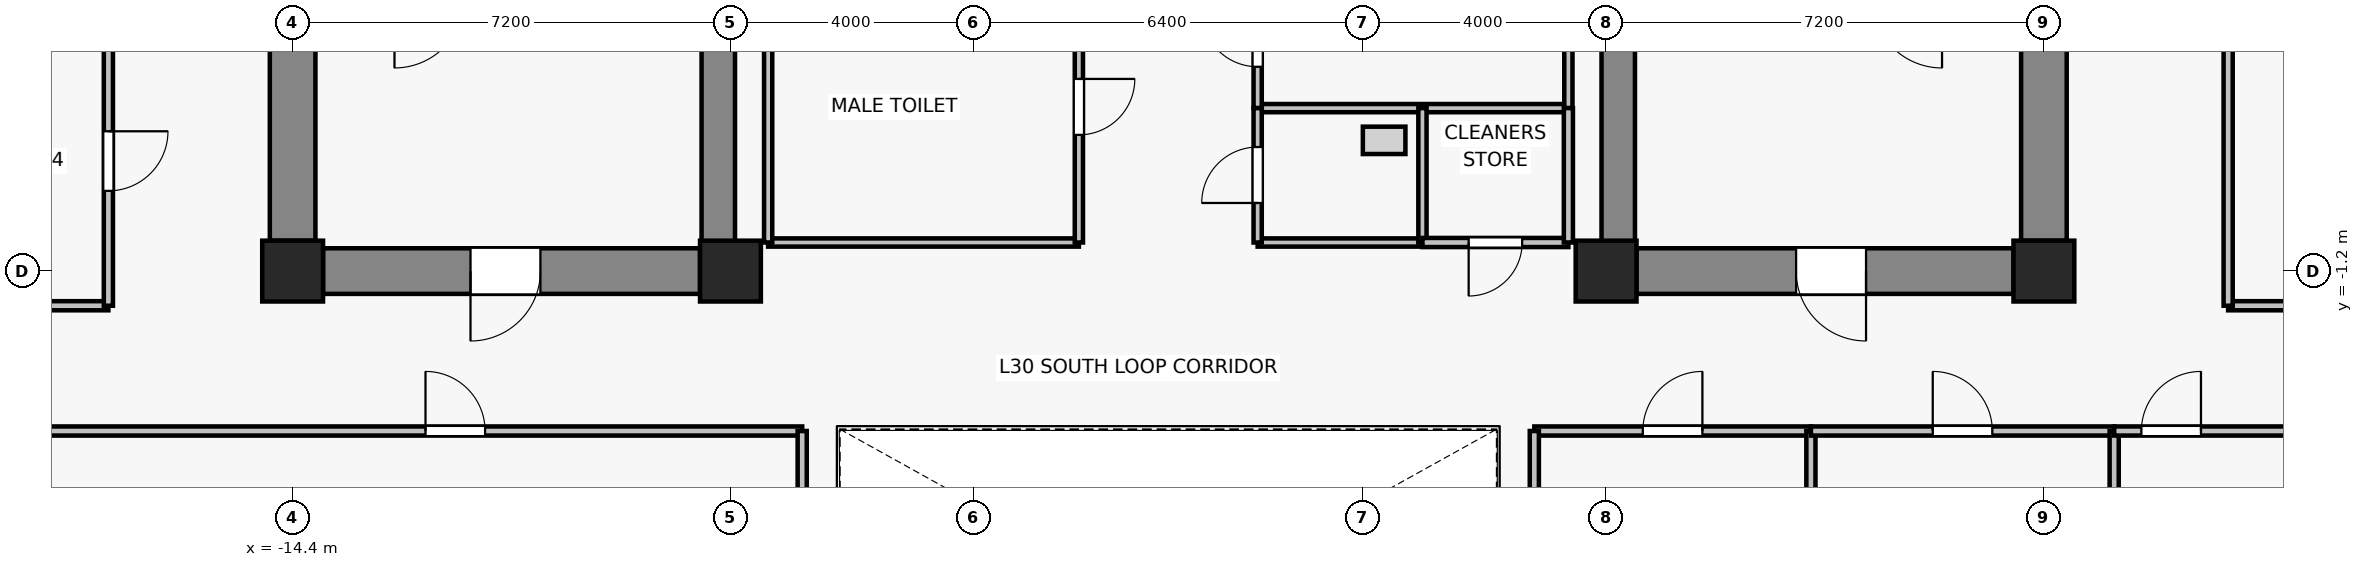
"""IFC4 building model, lengths in metres.
Left out: names, types, materials, properties, quantities, classifications, styles, units other than length and angle.
Written with IfcOpenShell. Run it as: python <this file> out.ifc"""

import sys

from ifc_helpers import new_model, si_unit, direction, frame, frame_2d, origin, origin_2d, place, context, subcontext, project, spatial, rectangle, extrude, source, transform, mapped, element, fill, save


model = new_model("IFC4")
c1 = context("Model", 3, precision=1e-05, world=origin(), true_north=direction((0.0, 1.0)))
c2 = subcontext(c1, "Body", "Model", "MODEL_VIEW")
j1 = project(units=[si_unit("LENGTHUNIT", "METRE"), si_unit("PLANEANGLEUNIT", "RADIAN")], contexts=[c1])
p1 = place(None, origin())
s1 = spatial("IfcSite", under=j1, at=p1, CompositionType="ELEMENT")
p2 = place(p1, origin())
s2 = spatial("IfcBuilding", under=s1, at=p2, CompositionType="ELEMENT")
p3 = place(p2, frame((0.0, 0.0, 109.9)))
s3 = spatial("IfcBuildingStorey", under=s2, at=p3, CompositionType="ELEMENT", Elevation=109.9)
for number, where, z_axis, x_axis in (
    (1, (-14.4, -1.2, 0.0), (0.0, 0.0, 1.0), (1.0, 0.0, 0.0)),
    (2, (-7.2, -1.2, 0.0), (0.0, 0.0, 1.0), (1.0, 0.0, 0.0)),
    (3, (7.2, -1.2, 0.0), (0.0, 0.0, 1.0), (1.0, 0.0, 0.0)),
    (4, (14.4, -1.2, 0.0), (0.0, 0.0, 1.0), (1.0, 0.0, 0.0)),
):
    element("IfcColumn", number, at=place(p3, frame(where, z_axis=z_axis, x_axis=x_axis)), inside=s3, PredefinedType="COLUMN", context=c2, shape_type="SweptSolid", body=[
        extrude(rectangle(XDim=1.0, YDim=1.0, at=origin_2d()), origin(), (0.0, 0.0, 1.0), 3.3),
    ])
for number, where, z_axis, x_axis in (
    (5, (-14.4, -0.7, 0.0), (0.0, 0.0, 1.0), (0.0, 1.0, 0.0)),
    (6, (14.4, -0.7, 0.0), (0.0, 0.0, 1.0), (0.0, 1.0, 0.0)),
):
    element("IfcWall", number, at=place(p3, frame(where, z_axis=z_axis, x_axis=x_axis)), inside=s3, PredefinedType="SHEAR", context=c2, shape_type="SweptSolid", body=[
        extrude(rectangle(XDim=6.8, YDim=0.75, at=frame_2d((3.4, 0.0))), origin(), (0.0, 0.0, 1.0), 3.075),
    ])
p4 = place(p3, frame((-7.7, -1.2, 0.0), z_axis=(0.0, 0.0, 1.0), x_axis=(-1.0, 0.0, 0.0)))
e7 = element("IfcWall", 7, at=p4, inside=s3, PredefinedType="SHEAR", context=c2, shape_type="SweptSolid", body=[
    extrude(rectangle(XDim=6.2, YDim=0.75, at=frame_2d((3.1, 0.0))), origin(), (0.0, 0.0, 1.0), 3.075),
])
p5 = place(p4, frame((2.625, 0.0, 0.0)))
e8 = element("IfcOpeningElement", 8, at=p5, cuts=e7, PredefinedType="OPENING", context=c2, shape_type="SweptSolid", body=[
    extrude(rectangle(XDim=1.15, YDim=2.15, at=frame_2d((0.575, 1.075))), frame((0.0, 0.385, 0.0), z_axis=(0.0, -1.0, 0.0), x_axis=(1.0, 0.0, 0.0)), (0.0, 0.0, 1.0), 0.77),
])
p6 = place(p3, frame((13.9, -1.2, 0.0), z_axis=(0.0, 0.0, 1.0), x_axis=(-1.0, 0.0, 0.0)))
e9 = element("IfcWall", 9, at=p6, inside=s3, PredefinedType="SHEAR", context=c2, shape_type="SweptSolid", body=[
    extrude(rectangle(XDim=6.2, YDim=0.75, at=frame_2d((3.1, 0.0))), origin(), (0.0, 0.0, 1.0), 3.075),
])
p7 = place(p6, frame((2.425, 0.0, 0.0)))
e10 = element("IfcOpeningElement", 10, at=p7, cuts=e9, PredefinedType="OPENING", context=c2, shape_type="SweptSolid", body=[
    extrude(rectangle(XDim=1.15, YDim=2.15, at=frame_2d((0.575, 1.075))), frame((0.0, 0.385, 0.0), z_axis=(0.0, -1.0, 0.0), x_axis=(1.0, 0.0, 0.0)), (0.0, 0.0, 1.0), 0.77),
])
for number, where, z_axis, x_axis in (
    (11, (-7.4, -0.825, 0.0), (0.0, 0.0, 1.0), (0.0, 1.0, 0.0)),
    (12, (7.4, -0.825, 0.0), (0.0, 0.0, 1.0), (0.0, 1.0, 0.0)),
):
    element("IfcWall", number, at=place(p3, frame(where, z_axis=z_axis, x_axis=x_axis)), inside=s3, PredefinedType="SHEAR", context=c2, shape_type="SweptSolid", body=[
        extrude(rectangle(XDim=4.075, YDim=0.55, at=frame_2d((2.038, 0.0))), origin(), (0.0, 0.0, 1.0), 3.075),
    ])
p8 = place(p3, frame((-1.47, -0.73, 0.0), z_axis=(0.0, 0.0, 1.0), x_axis=(-1.0, 0.0, 0.0)))
e13 = element("IfcWall", 13, at=p8, inside=s3, PredefinedType="PARTITIONING", context=c2, shape_type="SweptSolid", body=[
    extrude(rectangle(XDim=5.11, YDim=0.135, at=frame_2d((2.555, 0.0))), origin(), (0.0, 0.0, 1.0), 3.075),
])
p9 = place(p3, frame((-6.58, -0.73, 0.0), z_axis=(0.0, 0.0, 1.0), x_axis=(0.0, 1.0, 0.0)))
e14 = element("IfcWall", 14, at=p9, inside=s3, PredefinedType="PARTITIONING", context=c2, shape_type="SweptSolid", body=[
    extrude(rectangle(XDim=4.49, YDim=0.135, at=frame_2d((2.245, 0.0))), origin(), (0.0, 0.0, 1.0), 3.075),
])
p10 = place(p3, frame((-1.47, 3.76, 0.0), z_axis=(0.0, 0.0, 1.0), x_axis=(0.0, -1.0, 0.0)))
e15 = element("IfcWall", 15, at=p10, inside=s3, PredefinedType="PARTITIONING", context=c2, shape_type="SweptSolid", body=[
    extrude(rectangle(XDim=4.49, YDim=0.135, at=frame_2d((2.245, 0.0))), origin(), (0.0, 0.0, 1.0), 3.075),
])
p11 = place(p10, frame((1.8, 0.0, 0.0)))
e16 = element("IfcOpeningElement", 16, at=p11, cuts=e15, PredefinedType="OPENING", context=c2, shape_type="SweptSolid", body=[
    extrude(rectangle(XDim=0.92, YDim=2.1, at=frame_2d((0.46, 1.05))), frame((0.0, 0.077, 0.0), z_axis=(0.0, -1.0, 0.0), x_axis=(1.0, 0.0, 0.0)), (0.0, 0.0, 1.0), 0.155),
])
p12 = place(p3, frame((6.58, 1.48, 0.0), z_axis=(0.0, 0.0, 1.0), x_axis=(-1.0, 0.0, 0.0)))
e17 = element("IfcWall", 17, at=p12, inside=s3, PredefinedType="PARTITIONING", context=c2, shape_type="SweptSolid", body=[
    extrude(rectangle(XDim=5.11, YDim=0.135, at=frame_2d((2.555, 0.0))), origin(), (0.0, 0.0, 1.0), 3.075),
])
p13 = place(p3, frame((1.47, 1.48, 0.0), z_axis=(0.0, 0.0, 1.0), x_axis=(0.0, 1.0, 0.0)))
e18 = element("IfcWall", 18, at=p13, inside=s3, PredefinedType="PARTITIONING", context=c2, shape_type="SweptSolid", body=[
    extrude(rectangle(XDim=2.28, YDim=0.135, at=frame_2d((1.14, 0.0))), origin(), (0.0, 0.0, 1.0), 3.075),
])
p14 = place(p13, frame((0.68, 0.0, 0.0)))
e19 = element("IfcOpeningElement", 19, at=p14, cuts=e18, PredefinedType="OPENING", context=c2, shape_type="SweptSolid", body=[
    extrude(rectangle(XDim=0.92, YDim=2.1, at=frame_2d((0.46, 1.05))), frame((0.0, 0.077, 0.0), z_axis=(0.0, -1.0, 0.0), x_axis=(1.0, 0.0, 0.0)), (0.0, 0.0, 1.0), 0.155),
])
p15 = place(p3, frame((6.58, 3.76, 0.0), z_axis=(0.0, 0.0, 1.0), x_axis=(0.0, -1.0, 0.0)))
e20 = element("IfcWall", 20, at=p15, inside=s3, PredefinedType="PARTITIONING", context=c2, shape_type="SweptSolid", body=[
    extrude(rectangle(XDim=2.28, YDim=0.135, at=frame_2d((1.14, 0.0))), origin(), (0.0, 0.0, 1.0), 3.075),
])
p16 = place(p3, frame((4.18, -0.73, 0.0), z_axis=(0.0, 0.0, 1.0), x_axis=(-1.0, 0.0, 0.0)))
e21 = element("IfcWall", 21, at=p16, inside=s3, PredefinedType="PARTITIONING", context=c2, shape_type="SweptSolid", body=[
    extrude(rectangle(XDim=2.71, YDim=0.135, at=frame_2d((1.355, 0.0))), origin(), (0.0, 0.0, 1.0), 3.075),
])
p17 = place(p3, frame((1.47, -0.73, 0.0), z_axis=(0.0, 0.0, 1.0), x_axis=(0.0, 1.0, 0.0)))
e22 = element("IfcWall", 22, at=p17, inside=s3, PredefinedType="PARTITIONING", context=c2, shape_type="SweptSolid", body=[
    extrude(rectangle(XDim=2.21, YDim=0.135, at=frame_2d((1.105, 0.0))), origin(), (0.0, 0.0, 1.0), 3.075),
])
p18 = place(p17, frame((0.65, 0.0, 0.0)))
e23 = element("IfcOpeningElement", 23, at=p18, cuts=e22, PredefinedType="OPENING", context=c2, shape_type="SweptSolid", body=[
    extrude(rectangle(XDim=0.92, YDim=2.1, at=frame_2d((0.46, 1.05))), frame((0.0, 0.077, 0.0), z_axis=(0.0, -1.0, 0.0), x_axis=(1.0, 0.0, 0.0)), (0.0, 0.0, 1.0), 0.155),
])
p19 = place(p3, frame((4.18, 1.48, 0.0), z_axis=(0.0, 0.0, 1.0), x_axis=(0.0, -1.0, 0.0)))
e24 = element("IfcWall", 24, at=p19, inside=s3, PredefinedType="PARTITIONING", context=c2, shape_type="SweptSolid", body=[
    extrude(rectangle(XDim=2.21, YDim=0.135, at=frame_2d((1.105, 0.0))), origin(), (0.0, 0.0, 1.0), 3.075),
])
p20 = place(p3, frame((6.58, -0.73, 0.0), z_axis=(0.0, 0.0, 1.0), x_axis=(-1.0, 0.0, 0.0)))
e25 = element("IfcWall", 25, at=p20, inside=s3, PredefinedType="PARTITIONING", context=c2, shape_type="SweptSolid", body=[
    extrude(rectangle(XDim=2.4, YDim=0.15, at=frame_2d((1.2, 0.0))), origin(), (0.0, 0.0, 1.0), 3.075),
])
p21 = place(p20, frame((0.76, 0.0, 0.0)))
e26 = element("IfcOpeningElement", 26, at=p21, cuts=e25, PredefinedType="OPENING", context=c2, shape_type="SweptSolid", body=[
    extrude(rectangle(XDim=0.88, YDim=2.1, at=frame_2d((0.44, 1.05))), frame((0.0, 0.085, 0.0), z_axis=(0.0, -1.0, 0.0), x_axis=(1.0, 0.0, 0.0)), (0.0, 0.0, 1.0), 0.17),
])
p22 = place(p3, frame((6.58, 1.48, 0.0), z_axis=(0.0, 0.0, 1.0), x_axis=(0.0, -1.0, 0.0)))
e27 = element("IfcWall", 27, at=p22, inside=s3, PredefinedType="PARTITIONING", context=c2, shape_type="SweptSolid", body=[
    extrude(rectangle(XDim=2.21, YDim=0.15, at=frame_2d((1.105, 0.0))), origin(), (0.0, 0.0, 1.0), 3.075),
])
p23 = place(p3, frame((-29.53, -3.83, 0.0), z_axis=(0.0, 0.0, 1.0), x_axis=(1.0, 0.0, 0.0)))
e28 = element("IfcWall", 28, at=p23, inside=s3, PredefinedType="PARTITIONING", context=c2, shape_type="SweptSolid", body=[
    extrude(rectangle(XDim=23.51, YDim=0.15, at=frame_2d((11.755, 0.0))), origin(), (0.0, 0.0, 1.0), 2.515),
])
p24 = place(p23, frame((17.315, 0.0, 0.0)))
e29 = element("IfcOpeningElement", 29, at=p24, cuts=e28, PredefinedType="OPENING", context=c2, shape_type="SweptSolid", body=[
    extrude(rectangle(XDim=0.98, YDim=2.15, at=frame_2d((0.49, 1.075))), frame((0.0, 0.085, 0.0), z_axis=(0.0, -1.0, 0.0), x_axis=(1.0, 0.0, 0.0)), (0.0, 0.0, 1.0), 0.17),
])
p25 = place(p3, frame((-6.02, -3.83, 0.0), z_axis=(0.0, 0.0, 1.0), x_axis=(0.0, -1.0, 0.0)))
e30 = element("IfcWall", 30, at=p25, inside=s3, PredefinedType="PARTITIONING", context=c2, shape_type="SweptSolid", body=[
    extrude(rectangle(XDim=13.8, YDim=0.15, at=frame_2d((6.9, 0.0))), origin(), (0.0, 0.0, 1.0), 2.515),
])
p26 = place(p3, frame((6.02, -3.83, 0.0), z_axis=(0.0, 0.0, 1.0), x_axis=(1.0, 0.0, 0.0)))
e31 = element("IfcWall", 31, at=p26, inside=s3, PredefinedType="PARTITIONING", context=c2, shape_type="SweptSolid", body=[
    extrude(rectangle(XDim=4.548, YDim=0.15, at=frame_2d((2.274, 0.0))), origin(), (0.0, 0.0, 1.0), 2.515),
])
p27 = place(p26, frame((1.784, 0.0, 0.0)))
e32 = element("IfcOpeningElement", 32, at=p27, cuts=e31, PredefinedType="OPENING", context=c2, shape_type="SweptSolid", body=[
    extrude(rectangle(XDim=0.98, YDim=2.15, at=frame_2d((0.49, 1.075))), frame((0.0, 0.085, 0.0), z_axis=(0.0, -1.0, 0.0), x_axis=(1.0, 0.0, 0.0)), (0.0, 0.0, 1.0), 0.17),
])
for number, where, z_axis, x_axis in (
    (33, (6.02, -17.63, 0.0), (0.0, 0.0, 1.0), (0.0, 1.0, 0.0)),
    (34, (10.568, -3.83, 0.0), (0.0, 0.0, 1.0), (0.0, -1.0, 0.0)),
):
    element("IfcWall", number, at=place(p3, frame(where, z_axis=z_axis, x_axis=x_axis)), inside=s3, PredefinedType="PARTITIONING", context=c2, shape_type="SweptSolid", body=[
        extrude(rectangle(XDim=13.8, YDim=0.15, at=frame_2d((6.9, 0.0))), origin(), (0.0, 0.0, 1.0), 2.515),
    ])
p28 = place(p3, frame((10.568, -3.83, 0.0), z_axis=(0.0, 0.0, 1.0), x_axis=(1.0, 0.0, 0.0)))
e35 = element("IfcWall", 35, at=p28, inside=s3, PredefinedType="PARTITIONING", context=c2, shape_type="SweptSolid", body=[
    extrude(rectangle(XDim=4.987, YDim=0.15, at=frame_2d((2.494, 0.0))), origin(), (0.0, 0.0, 1.0), 2.515),
])
p29 = place(p28, frame((2.004, 0.0, 0.0)))
e36 = element("IfcOpeningElement", 36, at=p29, cuts=e35, PredefinedType="OPENING", context=c2, shape_type="SweptSolid", body=[
    extrude(rectangle(XDim=0.98, YDim=2.15, at=frame_2d((0.49, 1.075))), frame((0.0, 0.085, 0.0), z_axis=(0.0, -1.0, 0.0), x_axis=(1.0, 0.0, 0.0)), (0.0, 0.0, 1.0), 0.17),
])
p30 = place(p3, frame((15.556, -3.83, 0.0), z_axis=(0.0, 0.0, 1.0), x_axis=(0.0, -1.0, 0.0)))
e37 = element("IfcWall", 37, at=p30, inside=s3, PredefinedType="PARTITIONING", context=c2, shape_type="SweptSolid", body=[
    extrude(rectangle(XDim=13.8, YDim=0.15, at=frame_2d((6.9, 0.0))), origin(), (0.0, 0.0, 1.0), 2.515),
])
p31 = place(p3, frame((15.556, -3.83, 0.0), z_axis=(0.0, 0.0, 1.0), x_axis=(1.0, 0.0, 0.0)))
e38 = element("IfcWall", 38, at=p31, inside=s3, PredefinedType="PARTITIONING", context=c2, shape_type="SweptSolid", body=[
    extrude(rectangle(XDim=5.426, YDim=0.15, at=frame_2d((2.713, 0.0))), origin(), (0.0, 0.0, 1.0), 3.075),
])
p32 = place(p31, frame((0.448, 0.0, 0.0)))
e39 = element("IfcOpeningElement", 39, at=p32, cuts=e38, PredefinedType="OPENING", context=c2, shape_type="SweptSolid", body=[
    extrude(rectangle(XDim=0.98, YDim=2.15, at=frame_2d((0.49, 1.075))), frame((0.0, 0.085, 0.0), z_axis=(0.0, -1.0, 0.0), x_axis=(1.0, 0.0, 0.0)), (0.0, 0.0, 1.0), 0.17),
])
p33 = place(p3, frame((-17.43, -1.77, 0.0), z_axis=(0.0, 0.0, 1.0), x_axis=(-1.0, 0.0, 0.0)))
e40 = element("IfcWall", 40, at=p33, inside=s3, PredefinedType="PARTITIONING", context=c2, shape_type="SweptSolid", body=[
    extrude(rectangle(XDim=12.1, YDim=0.15, at=frame_2d((6.05, 0.0))), origin(), (0.0, 0.0, 1.0), 2.515),
])
p34 = place(p3, frame((-17.43, 2.987, 0.0), z_axis=(0.0, 0.0, 1.0), x_axis=(0.0, -1.0, 0.0)))
e41 = element("IfcWall", 41, at=p34, inside=s3, PredefinedType="PARTITIONING", context=c2, shape_type="SweptSolid", body=[
    extrude(rectangle(XDim=4.757, YDim=0.15, at=frame_2d((2.378, 0.0))), origin(), (0.0, 0.0, 1.0), 2.515),
])
p35 = place(p34, frame((1.888, 0.0, 0.0)))
e42 = element("IfcOpeningElement", 42, at=p35, cuts=e41, PredefinedType="OPENING", context=c2, shape_type="SweptSolid", body=[
    extrude(rectangle(XDim=0.98, YDim=2.15, at=frame_2d((0.49, 1.075))), frame((0.0, 0.085, 0.0), z_axis=(0.0, -1.0, 0.0), x_axis=(1.0, 0.0, 0.0)), (0.0, 0.0, 1.0), 0.17),
])
p36 = place(p3, frame((25.53, -1.77, 0.0), z_axis=(0.0, 0.0, 1.0), x_axis=(-1.0, 0.0, 0.0)))
e43 = element("IfcWall", 43, at=p36, inside=s3, PredefinedType="PARTITIONING", context=c2, shape_type="SweptSolid", body=[
    extrude(rectangle(XDim=8.1, YDim=0.15, at=frame_2d((4.05, 0.0))), origin(), (0.0, 0.0, 1.0), 2.515),
])
p37 = place(p3, frame((17.43, -1.77, 0.0), z_axis=(0.0, 0.0, 1.0), x_axis=(0.0, 1.0, 0.0)))
e44 = element("IfcWall", 44, at=p37, inside=s3, PredefinedType="PARTITIONING", context=c2, shape_type="SweptSolid", body=[
    extrude(rectangle(XDim=15.65, YDim=0.15, at=frame_2d((7.825, 0.0))), origin(), (0.0, 0.0, 1.0), 2.515),
])
p38 = place(p37, frame((7.335, 0.0, 0.0)))
e45 = element("IfcOpeningElement", 45, at=p38, cuts=e44, PredefinedType="OPENING", context=c2, shape_type="SweptSolid", body=[
    extrude(rectangle(XDim=0.98, YDim=2.15, at=frame_2d((0.49, 1.075))), frame((0.0, 0.085, 0.0), z_axis=(0.0, -1.0, 0.0), x_axis=(1.0, 0.0, 0.0)), (0.0, 0.0, 1.0), 0.17),
])
m1 = source(origin(), c2, "Body", "SweptSolid", [
    extrude(rectangle(XDim=1.15, YDim=2.15, at=frame_2d((0.575, 1.075))), frame((0.0, 0.025, 0.0), z_axis=(0.0, -1.0, 0.0), x_axis=(1.0, 0.0, 0.0)), (0.0, 0.0, 1.0), 0.05),
])
p39 = place(p5, origin())
e46 = element("IfcDoor", 46, at=p39, inside=s3, OperationType="SINGLE_SWING_RIGHT", PredefinedType="DOOR", context=c2, shape_type="MappedRepresentation", body=[
    mapped(m1, transform((0.0, 0.0, 0.0), x_axis=(1.0, 0.0, 0.0), y_axis=(0.0, 1.0, 0.0), z_axis=(0.0, 0.0, 1.0), scale=1.0)),
])
fill(e8, e46)
p40 = place(p7, origin())
e47 = element("IfcDoor", 47, at=p40, inside=s3, OperationType="SINGLE_SWING_LEFT", PredefinedType="DOOR", context=c2, shape_type="MappedRepresentation", body=[
    mapped(m1, transform((0.0, 0.0, 0.0), x_axis=(1.0, 0.0, 0.0), y_axis=(0.0, 1.0, 0.0), z_axis=(0.0, 0.0, 1.0), scale=1.0)),
])
fill(e10, e47)
m2 = source(origin(), c2, "Body", "SweptSolid", [
    extrude(rectangle(XDim=0.92, YDim=2.1, at=frame_2d((0.46, 1.05))), frame((0.0, 0.025, 0.0), z_axis=(0.0, -1.0, 0.0), x_axis=(1.0, 0.0, 0.0)), (0.0, 0.0, 1.0), 0.05),
])
p41 = place(p11, origin())
e48 = element("IfcDoor", 48, at=p41, inside=s3, OperationType="SINGLE_SWING_LEFT", PredefinedType="DOOR", context=c2, shape_type="MappedRepresentation", body=[
    mapped(m2, transform((0.0, 0.0, 0.0), x_axis=(1.0, 0.0, 0.0), y_axis=(0.0, 1.0, 0.0), z_axis=(0.0, 0.0, 1.0), scale=1.0)),
])
fill(e16, e48)
p42 = place(p14, origin())
e49 = element("IfcDoor", 49, at=p42, inside=s3, OperationType="SINGLE_SWING_RIGHT", PredefinedType="DOOR", context=c2, shape_type="MappedRepresentation", body=[
    mapped(m2, transform((0.0, 0.0, 0.0), x_axis=(1.0, 0.0, 0.0), y_axis=(0.0, 1.0, 0.0), z_axis=(0.0, 0.0, 1.0), scale=1.0)),
])
fill(e19, e49)
p43 = place(p18, origin())
e50 = element("IfcDoor", 50, at=p43, inside=s3, OperationType="SINGLE_SWING_LEFT", PredefinedType="DOOR", context=c2, shape_type="MappedRepresentation", body=[
    mapped(m2, transform((0.0, 0.0, 0.0), x_axis=(1.0, 0.0, 0.0), y_axis=(0.0, 1.0, 0.0), z_axis=(0.0, 0.0, 1.0), scale=1.0)),
])
fill(e23, e50)
m3 = source(origin(), c2, "Body", "SweptSolid", [
    extrude(rectangle(XDim=0.88, YDim=2.1, at=frame_2d((0.44, 1.05))), frame((0.0, 0.025, 0.0), z_axis=(0.0, -1.0, 0.0), x_axis=(1.0, 0.0, 0.0)), (0.0, 0.0, 1.0), 0.05),
])
p44 = place(p21, origin())
e51 = element("IfcDoor", 51, at=p44, inside=s3, OperationType="SINGLE_SWING_RIGHT", PredefinedType="DOOR", context=c2, shape_type="MappedRepresentation", body=[
    mapped(m3, transform((0.0, 0.0, 0.0), x_axis=(1.0, 0.0, 0.0), y_axis=(0.0, 1.0, 0.0), z_axis=(0.0, 0.0, 1.0), scale=1.0)),
])
fill(e26, e51)
m4 = source(origin(), c2, "Body", "SweptSolid", [
    extrude(rectangle(XDim=0.98, YDim=2.15, at=frame_2d((0.49, 1.075))), frame((0.0, 0.025, 0.0), z_axis=(0.0, -1.0, 0.0), x_axis=(1.0, 0.0, 0.0)), (0.0, 0.0, 1.0), 0.05),
])
p45 = place(p24, origin())
e52 = element("IfcDoor", 52, at=p45, inside=s3, OperationType="SINGLE_SWING_LEFT", PredefinedType="DOOR", context=c2, shape_type="MappedRepresentation", body=[
    mapped(m4, transform((0.0, 0.0, 0.0), x_axis=(1.0, 0.0, 0.0), y_axis=(0.0, 1.0, 0.0), z_axis=(0.0, 0.0, 1.0), scale=1.0)),
])
fill(e29, e52)
p46 = place(p27, origin())
e53 = element("IfcDoor", 53, at=p46, inside=s3, OperationType="SINGLE_SWING_RIGHT", PredefinedType="DOOR", context=c2, shape_type="MappedRepresentation", body=[
    mapped(m4, transform((0.0, 0.0, 0.0), x_axis=(1.0, 0.0, 0.0), y_axis=(0.0, 1.0, 0.0), z_axis=(0.0, 0.0, 1.0), scale=1.0)),
])
fill(e32, e53)
p47 = place(p29, origin())
e54 = element("IfcDoor", 54, at=p47, inside=s3, OperationType="SINGLE_SWING_LEFT", PredefinedType="DOOR", context=c2, shape_type="MappedRepresentation", body=[
    mapped(m4, transform((0.0, 0.0, 0.0), x_axis=(1.0, 0.0, 0.0), y_axis=(0.0, 1.0, 0.0), z_axis=(0.0, 0.0, 1.0), scale=1.0)),
])
fill(e36, e54)
p48 = place(p32, origin())
e55 = element("IfcDoor", 55, at=p48, inside=s3, OperationType="SINGLE_SWING_RIGHT", PredefinedType="DOOR", context=c2, shape_type="MappedRepresentation", body=[
    mapped(m4, transform((0.0, 0.0, 0.0), x_axis=(1.0, 0.0, 0.0), y_axis=(0.0, 1.0, 0.0), z_axis=(0.0, 0.0, 1.0), scale=1.0)),
])
fill(e39, e55)
p49 = place(p35, origin())
e56 = element("IfcDoor", 56, at=p49, inside=s3, OperationType="SINGLE_SWING_LEFT", PredefinedType="DOOR", context=c2, shape_type="MappedRepresentation", body=[
    mapped(m4, transform((0.0, 0.0, 0.0), x_axis=(1.0, 0.0, 0.0), y_axis=(0.0, 1.0, 0.0), z_axis=(0.0, 0.0, 1.0), scale=1.0)),
])
fill(e42, e56)
save(model, sys.argv[1])
